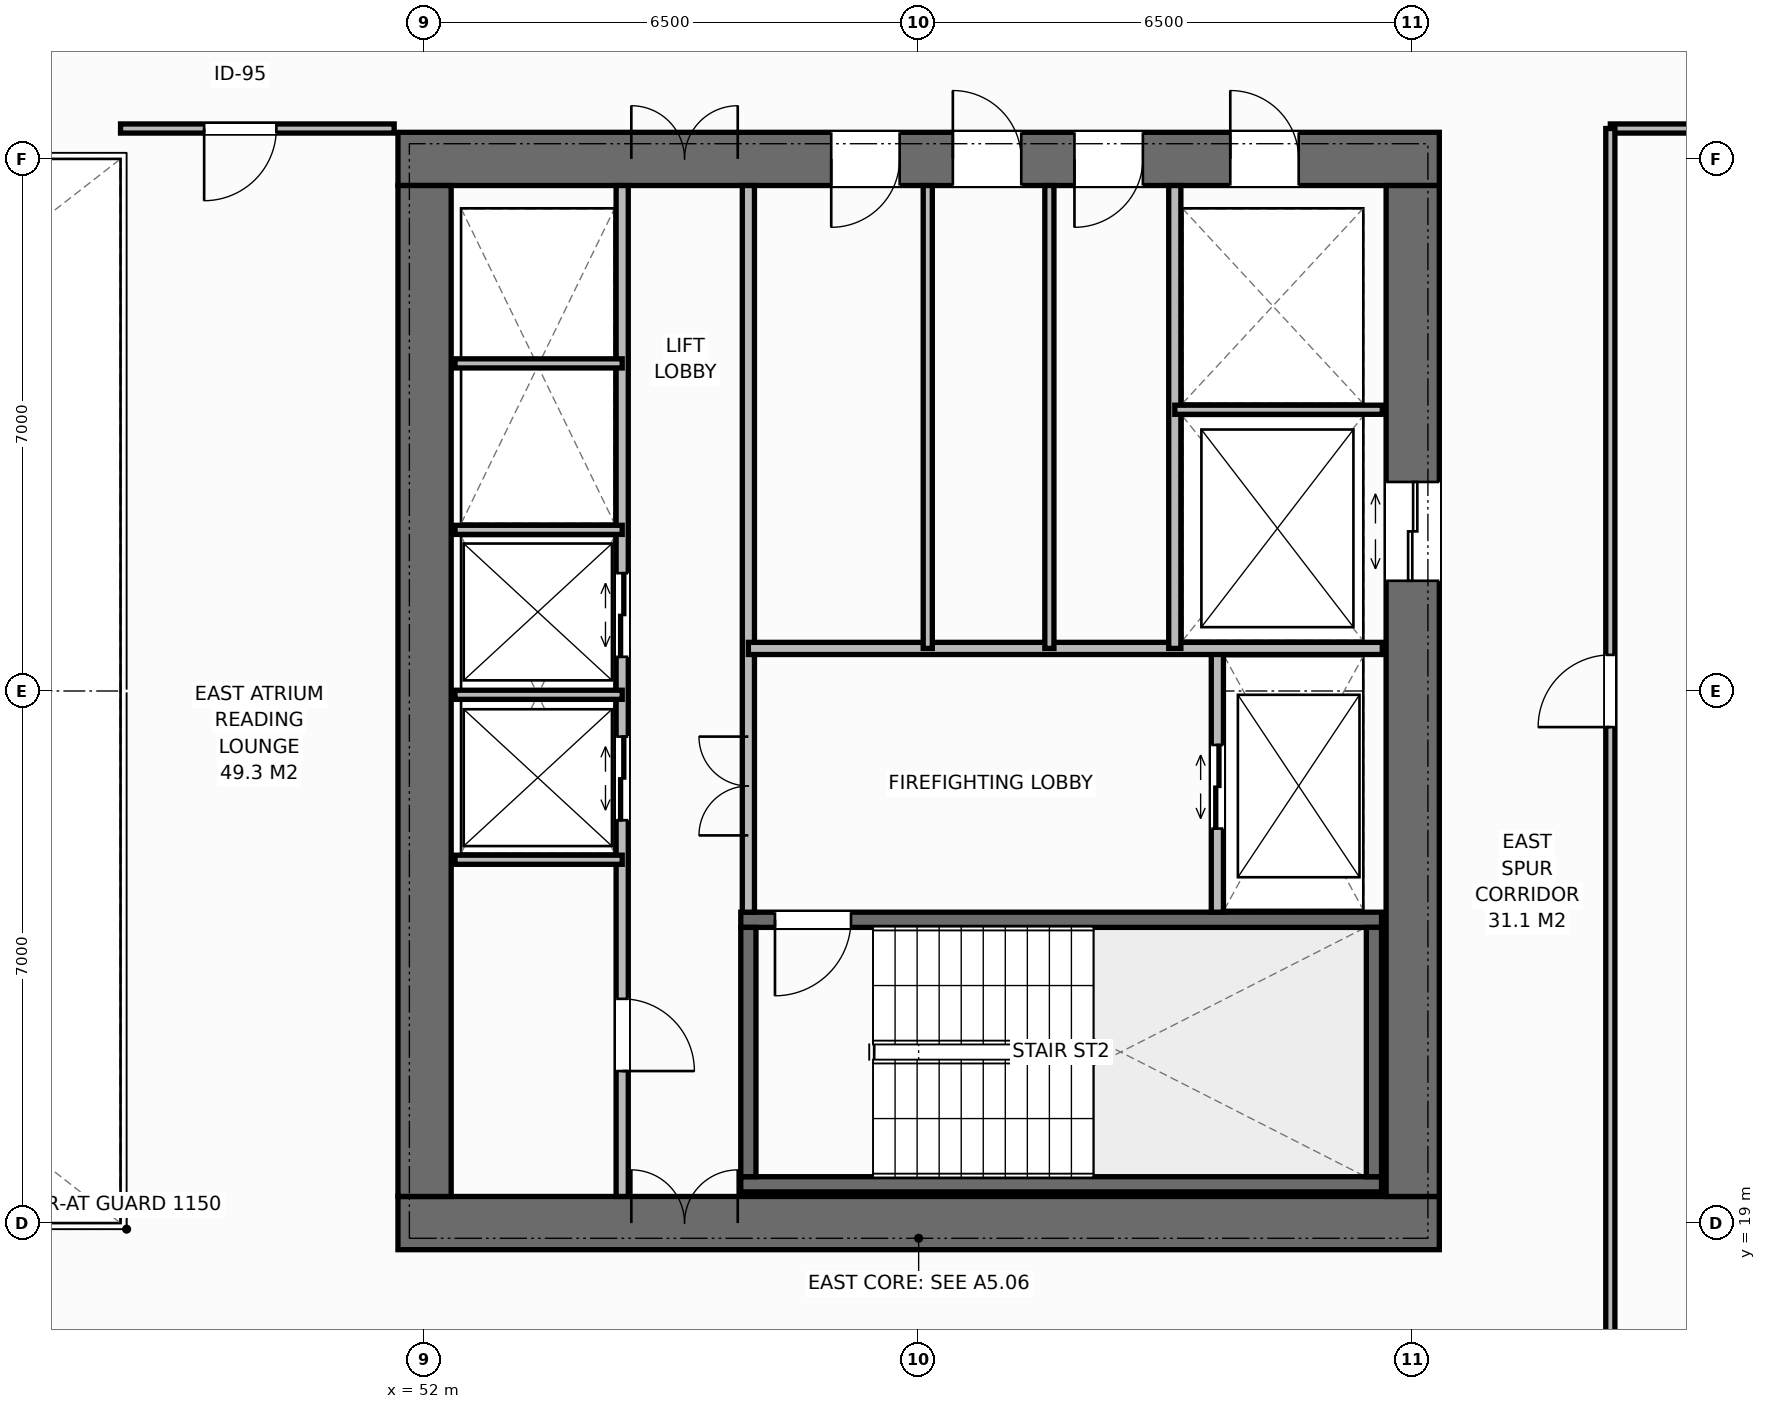
"""IFC4 building model, lengths in metres.
Left out: names, types, materials, properties, quantities, classifications, styles, units other than length and angle.
Written with IfcOpenShell. Run it as: python <this file> out.ifc"""

import sys

from ifc_helpers import new_model, si_unit, direction, frame, frame_2d, origin, place, context, subcontext, project, spatial, rectangle, extrude, element, fill, save


model = new_model("IFC4")
c1 = context("Model", 3, precision=1e-05, world=origin(), true_north=direction((0.0, 1.0)))
c2 = subcontext(c1, "Body", "Model", "MODEL_VIEW")
j1 = project(units=[si_unit("LENGTHUNIT", "METRE"), si_unit("PLANEANGLEUNIT", "RADIAN")], contexts=[c1])
p1 = place(None, origin())
s1 = spatial("IfcSite", under=j1, at=p1, CompositionType="ELEMENT")
p2 = place(p1, origin())
s2 = spatial("IfcBuilding", under=s1, at=p2, CompositionType="ELEMENT")
p3 = place(p2, frame((0.0, 0.0, 105.0)))
s3 = spatial("IfcBuildingStorey", under=s2, at=p3, CompositionType="ELEMENT", Elevation=105.0)
p4 = place(p3, frame((51.65, 19.0, 0.0), z_axis=(0.0, 0.0, 1.0), x_axis=(1.0, 0.0, 0.0)))
e1 = element("IfcWall", 1, at=p4, inside=s3, PredefinedType="SHEAR", context=c2, shape_type="SweptSolid", body=[
    extrude(rectangle(XDim=13.7, YDim=0.7, at=frame_2d((6.85, 0.0))), origin(), (0.0, 0.0, 1.0), 3.8),
])
p5 = place(p4, frame((3.07, 0.0, 0.0)))
e2 = element("IfcOpeningElement", 2, at=p5, cuts=e1, PredefinedType="OPENING", context=c2, shape_type="SweptSolid", body=[
    extrude(rectangle(XDim=1.4, YDim=2.2, at=frame_2d((0.7, 1.1))), frame((0.0, 0.36, 0.0), z_axis=(0.0, -1.0, 0.0), x_axis=(1.0, 0.0, 0.0)), (0.0, 0.0, 1.0), 0.72),
])
p6 = place(p3, frame((51.65, 33.0, 0.0), z_axis=(0.0, 0.0, 1.0), x_axis=(1.0, 0.0, 0.0)))
e3 = element("IfcWall", 3, at=p6, inside=s3, PredefinedType="SHEAR", context=c2, shape_type="SweptSolid", body=[
    extrude(rectangle(XDim=13.7, YDim=0.7, at=frame_2d((6.85, 0.0))), origin(), (0.0, 0.0, 1.0), 3.8),
])
p7 = place(p6, frame((3.07, 0.0, 0.0)))
e4 = element("IfcOpeningElement", 4, at=p7, cuts=e3, PredefinedType="OPENING", context=c2, shape_type="SweptSolid", body=[
    extrude(rectangle(XDim=1.4, YDim=2.2, at=frame_2d((0.7, 1.1))), frame((0.0, 0.36, 0.0), z_axis=(0.0, -1.0, 0.0), x_axis=(1.0, 0.0, 0.0)), (0.0, 0.0, 1.0), 0.72),
])
p8 = place(p6, frame((10.95, 0.0, 0.0)))
e5 = element("IfcOpeningElement", 5, at=p8, cuts=e3, PredefinedType="OPENING", context=c2, shape_type="SweptSolid", body=[
    extrude(rectangle(XDim=0.9, YDim=2.15, at=frame_2d((0.45, 1.075))), frame((0.0, 0.36, 0.0), z_axis=(0.0, -1.0, 0.0), x_axis=(1.0, 0.0, 0.0)), (0.0, 0.0, 1.0), 0.72),
])
p9 = place(p6, frame((5.7, 0.0, 0.0)))
e6 = element("IfcOpeningElement", 6, at=p9, cuts=e3, PredefinedType="OPENING", context=c2, shape_type="SweptSolid", body=[
    extrude(rectangle(XDim=0.9, YDim=2.15, at=frame_2d((0.45, 1.075))), frame((0.0, 0.36, 0.0), z_axis=(0.0, -1.0, 0.0), x_axis=(1.0, 0.0, 0.0)), (0.0, 0.0, 1.0), 0.72),
])
p10 = place(p6, frame((7.3, 0.0, 0.0)))
e7 = element("IfcOpeningElement", 7, at=p10, cuts=e3, PredefinedType="OPENING", context=c2, shape_type="SweptSolid", body=[
    extrude(rectangle(XDim=0.9, YDim=2.15, at=frame_2d((0.45, 1.075))), frame((0.0, 0.36, 0.0), z_axis=(0.0, -1.0, 0.0), x_axis=(1.0, 0.0, 0.0)), (0.0, 0.0, 1.0), 0.72),
])
p11 = place(p6, frame((8.9, 0.0, 0.0)))
e8 = element("IfcOpeningElement", 8, at=p11, cuts=e3, PredefinedType="OPENING", context=c2, shape_type="SweptSolid", body=[
    extrude(rectangle(XDim=0.9, YDim=2.15, at=frame_2d((0.45, 1.075))), frame((0.0, 0.36, 0.0), z_axis=(0.0, -1.0, 0.0), x_axis=(1.0, 0.0, 0.0)), (0.0, 0.0, 1.0), 0.72),
])
p12 = place(p3, frame((52.0, 19.35, 0.0), z_axis=(0.0, 0.0, 1.0), x_axis=(0.0, 1.0, 0.0)))
e9 = element("IfcWall", 9, at=p12, inside=s3, PredefinedType="SHEAR", context=c2, shape_type="SweptSolid", body=[
    extrude(rectangle(XDim=13.3, YDim=0.7, at=frame_2d((6.65, 0.0))), origin(), (0.0, 0.0, 1.0), 3.8),
])
p13 = place(p3, frame((65.0, 19.35, 0.0), z_axis=(0.0, 0.0, 1.0), x_axis=(0.0, 1.0, 0.0)))
e10 = element("IfcWall", 10, at=p13, inside=s3, PredefinedType="SHEAR", context=c2, shape_type="SweptSolid", body=[
    extrude(rectangle(XDim=13.3, YDim=0.7, at=frame_2d((6.65, 0.0))), origin(), (0.0, 0.0, 1.0), 3.8),
])
p14 = place(p13, frame((8.1, 0.0, 0.0)))
e11 = element("IfcOpeningElement", 11, at=p14, cuts=e10, PredefinedType="OPENING", context=c2, shape_type="SweptSolid", body=[
    extrude(rectangle(XDim=1.3, YDim=2.2, at=frame_2d((0.65, 1.1))), frame((0.0, 0.36, 0.0), z_axis=(0.0, -1.0, 0.0), x_axis=(1.0, 0.0, 0.0)), (0.0, 0.0, 1.0), 0.72),
])
p15 = place(p3, frame((56.16, 19.51, 0.0), z_axis=(0.0, 0.0, 1.0), x_axis=(1.0, 0.0, 0.0)))
e12 = element("IfcWall", 12, at=p15, inside=s3, PredefinedType="SHEAR", context=c2, shape_type="SweptSolid", body=[
    extrude(rectangle(XDim=8.43, YDim=0.2, at=frame_2d((4.215, 0.0))), origin(), (0.0, 0.0, 1.0), 3.8),
])
p16 = place(p3, frame((56.16, 22.99, 0.0), z_axis=(0.0, 0.0, 1.0), x_axis=(1.0, 0.0, 0.0)))
e13 = element("IfcWall", 13, at=p16, inside=s3, PredefinedType="SHEAR", context=c2, shape_type="SweptSolid", body=[
    extrude(rectangle(XDim=8.43, YDim=0.2, at=frame_2d((4.215, 0.0))), origin(), (0.0, 0.0, 1.0), 3.8),
])
p17 = place(p16, frame((0.45, 0.0, 0.0)))
e14 = element("IfcOpeningElement", 14, at=p17, cuts=e13, PredefinedType="OPENING", context=c2, shape_type="SweptSolid", body=[
    extrude(rectangle(XDim=1.0, YDim=2.15, at=frame_2d((0.5, 1.075))), frame((0.0, 0.11, 0.0), z_axis=(0.0, -1.0, 0.0), x_axis=(1.0, 0.0, 0.0)), (0.0, 0.0, 1.0), 0.22),
])
for number, where, z_axis, x_axis in (
    (15, (56.26, 19.61, 0.0), (0.0, 0.0, 1.0), (0.0, 1.0, 0.0)),
    (16, (64.49, 19.61, 0.0), (0.0, 0.0, 1.0), (0.0, 1.0, 0.0)),
):
    element("IfcWall", number, at=place(p3, frame(where, z_axis=z_axis, x_axis=x_axis)), inside=s3, PredefinedType="SHEAR", context=c2, shape_type="SweptSolid", body=[
        extrude(rectangle(XDim=3.28, YDim=0.2, at=frame_2d((1.64, 0.0))), origin(), (0.0, 0.0, 1.0), 3.8),
    ])
p18 = place(p3, frame((54.6, 19.35, 0.0), z_axis=(0.0, 0.0, 1.0), x_axis=(0.0, 1.0, 0.0)))
e17 = element("IfcWall", 17, at=p18, inside=s3, PredefinedType="STANDARD", context=c2, shape_type="SweptSolid", body=[
    extrude(rectangle(XDim=13.3, YDim=0.16, at=frame_2d((6.65, 0.0))), origin(), (0.0, 0.0, 1.0), 3.565),
])
p19 = place(p18, frame((1.65, 0.0, 0.0)))
e18 = element("IfcOpeningElement", 18, at=p19, cuts=e17, PredefinedType="OPENING", context=c2, shape_type="SweptSolid", body=[
    extrude(rectangle(XDim=0.95, YDim=2.15, at=frame_2d((0.475, 1.075))), frame((0.0, 0.09, 0.0), z_axis=(0.0, -1.0, 0.0), x_axis=(1.0, 0.0, 0.0)), (0.0, 0.0, 1.0), 0.18),
])
p20 = place(p18, frame((4.95, 0.0, 0.0)))
e19 = element("IfcOpeningElement", 19, at=p20, cuts=e17, PredefinedType="OPENING", context=c2, shape_type="SweptSolid", body=[
    extrude(rectangle(XDim=1.1, YDim=2.2, at=frame_2d((0.55, 1.1))), frame((0.0, 0.09, 0.0), z_axis=(0.0, -1.0, 0.0), x_axis=(1.0, 0.0, 0.0)), (0.0, 0.0, 1.0), 0.18),
])
p21 = place(p18, frame((7.1, 0.0, 0.0)))
e20 = element("IfcOpeningElement", 20, at=p21, cuts=e17, PredefinedType="OPENING", context=c2, shape_type="SweptSolid", body=[
    extrude(rectangle(XDim=1.1, YDim=2.2, at=frame_2d((0.55, 1.1))), frame((0.0, 0.09, 0.0), z_axis=(0.0, -1.0, 0.0), x_axis=(1.0, 0.0, 0.0)), (0.0, 0.0, 1.0), 0.18),
])
p22 = place(p3, frame((56.26, 23.09, 0.0), z_axis=(0.0, 0.0, 1.0), x_axis=(0.0, 1.0, 0.0)))
e21 = element("IfcWall", 21, at=p22, inside=s3, PredefinedType="STANDARD", context=c2, shape_type="SweptSolid", body=[
    extrude(rectangle(XDim=9.56, YDim=0.16, at=frame_2d((4.78, 0.0))), origin(), (0.0, 0.0, 1.0), 3.565),
])
p23 = place(p22, frame((1.01, 0.0, 0.0)))
e22 = element("IfcOpeningElement", 22, at=p23, cuts=e21, PredefinedType="OPENING", context=c2, shape_type="SweptSolid", body=[
    extrude(rectangle(XDim=1.3, YDim=2.2, at=frame_2d((0.65, 1.1))), frame((0.0, 0.09, 0.0), z_axis=(0.0, -1.0, 0.0), x_axis=(1.0, 0.0, 0.0)), (0.0, 0.0, 1.0), 0.18),
])
for number, where, z_axis, x_axis in (
    (23, (52.4, 23.78, 0.0), (0.0, 0.0, 1.0), (1.0, 0.0, 0.0)),
    (24, (52.4, 25.95, 0.0), (0.0, 0.0, 1.0), (1.0, 0.0, 0.0)),
    (25, (52.4, 28.12, 0.0), (0.0, 0.0, 1.0), (1.0, 0.0, 0.0)),
    (26, (52.4, 30.31, 0.0), (0.0, 0.0, 1.0), (1.0, 0.0, 0.0)),
):
    element("IfcWall", number, at=place(p3, frame(where, z_axis=z_axis, x_axis=x_axis)), inside=s3, PredefinedType="PARTITIONING", context=c2, shape_type="SweptSolid", body=[
        extrude(rectangle(XDim=2.2, YDim=0.12, at=frame_2d((1.1, 0.0))), origin(), (0.0, 0.0, 1.0), 3.565),
    ])
p24 = place(p3, frame((62.43, 23.09, 0.0), z_axis=(0.0, 0.0, 1.0), x_axis=(0.0, 1.0, 0.0)))
e27 = element("IfcWall", 27, at=p24, inside=s3, PredefinedType="STANDARD", context=c2, shape_type="SweptSolid", body=[
    extrude(rectangle(XDim=3.47, YDim=0.16, at=frame_2d((1.735, 0.0))), origin(), (0.0, 0.0, 1.0), 3.565),
])
p25 = place(p24, frame((1.1, 0.0, 0.0)))
e28 = element("IfcOpeningElement", 28, at=p25, cuts=e27, PredefinedType="OPENING", context=c2, shape_type="SweptSolid", body=[
    extrude(rectangle(XDim=1.1, YDim=2.2, at=frame_2d((0.55, 1.1))), frame((0.0, 0.09, 0.0), z_axis=(0.0, -1.0, 0.0), x_axis=(1.0, 0.0, 0.0)), (0.0, 0.0, 1.0), 0.18),
])
p26 = place(p3, frame((56.26, 26.56, 0.0), z_axis=(0.0, 0.0, 1.0), x_axis=(1.0, 0.0, 0.0)))
e29 = element("IfcWall", 29, at=p26, inside=s3, PredefinedType="STANDARD", context=c2, shape_type="SweptSolid", body=[
    extrude(rectangle(XDim=8.34, YDim=0.16, at=frame_2d((4.17, 0.0))), origin(), (0.0, 0.0, 1.0), 3.565),
])
p27 = place(p3, frame((61.87, 26.56, 0.0), z_axis=(0.0, 0.0, 1.0), x_axis=(0.0, 1.0, 0.0)))
e30 = element("IfcWall", 30, at=p27, inside=s3, PredefinedType="STANDARD", context=c2, shape_type="SweptSolid", body=[
    extrude(rectangle(XDim=6.09, YDim=0.16, at=frame_2d((3.045, 0.0))), origin(), (0.0, 0.0, 1.0), 3.565),
])
p28 = place(p3, frame((61.87, 29.7, 0.0), z_axis=(0.0, 0.0, 1.0), x_axis=(1.0, 0.0, 0.0)))
e31 = element("IfcWall", 31, at=p28, inside=s3, PredefinedType="PARTITIONING", context=c2, shape_type="SweptSolid", body=[
    extrude(rectangle(XDim=2.73, YDim=0.12, at=frame_2d((1.365, 0.0))), origin(), (0.0, 0.0, 1.0), 3.565),
])
for number, where, z_axis, x_axis in (
    (32, (58.62, 26.56, 0.0), (0.0, 0.0, 1.0), (0.0, 1.0, 0.0)),
    (33, (60.22, 26.56, 0.0), (0.0, 0.0, 1.0), (0.0, 1.0, 0.0)),
):
    element("IfcWall", number, at=place(p3, frame(where, z_axis=z_axis, x_axis=x_axis)), inside=s3, PredefinedType="PARTITIONING", context=c2, shape_type="SweptSolid", body=[
        extrude(rectangle(XDim=6.09, YDim=0.12, at=frame_2d((3.045, 0.0))), origin(), (0.0, 0.0, 1.0), 3.565),
    ])
p29 = place(p3, frame((48.0, 33.4, 0.0), z_axis=(0.0, 0.0, 1.0), x_axis=(1.0, 0.0, 0.0)))
e34 = element("IfcWall", 34, at=p29, inside=s3, PredefinedType="PARTITIONING", context=c2, shape_type="SweptSolid", body=[
    extrude(rectangle(XDim=3.6, YDim=0.12, at=frame_2d((1.8, 0.0))), origin(), (0.0, 0.0, 1.0), 3.565),
])
p30 = place(p29, frame((1.1, 0.0, 0.0)))
e35 = element("IfcOpeningElement", 35, at=p30, cuts=e34, PredefinedType="OPENING", context=c2, shape_type="SweptSolid", body=[
    extrude(rectangle(XDim=0.95, YDim=2.15, at=frame_2d((0.475, 1.075))), frame((0.0, 0.07, 0.0), z_axis=(0.0, -1.0, 0.0), x_axis=(1.0, 0.0, 0.0)), (0.0, 0.0, 1.0), 0.14),
])
p31 = place(p3, frame((67.6, 33.4, 0.0), z_axis=(0.0, 0.0, 1.0), x_axis=(1.0, 0.0, 0.0)))
e36 = element("IfcWall", 36, at=p31, inside=s3, PredefinedType="PARTITIONING", context=c2, shape_type="SweptSolid", body=[
    extrude(rectangle(XDim=8.58, YDim=0.12, at=frame_2d((4.29, 0.0))), origin(), (0.0, 0.0, 1.0), 3.565),
])
p32 = place(p3, frame((67.6, 16.5, 0.0), z_axis=(0.0, 0.0, 1.0), x_axis=(0.0, 1.0, 0.0)))
e37 = element("IfcWall", 37, at=p32, inside=s3, PredefinedType="PARTITIONING", context=c2, shape_type="SweptSolid", body=[
    extrude(rectangle(XDim=16.9, YDim=0.12, at=frame_2d((8.45, 0.0))), origin(), (0.0, 0.0, 1.0), 3.565),
])
p33 = place(p32, frame((9.025, 0.0, 0.0)))
e38 = element("IfcOpeningElement", 38, at=p33, cuts=e37, PredefinedType="OPENING", context=c2, shape_type="SweptSolid", body=[
    extrude(rectangle(XDim=0.95, YDim=2.15, at=frame_2d((0.475, 1.075))), frame((0.0, 0.07, 0.0), z_axis=(0.0, -1.0, 0.0), x_axis=(1.0, 0.0, 0.0)), (0.0, 0.0, 1.0), 0.14),
])
p34 = place(p5, origin())
e39 = element("IfcDoor", 39, at=p34, inside=s3, OperationType="DOUBLE_DOOR_SINGLE_SWING", PredefinedType="DOOR", context=c2, shape_type="SweptSolid", body=[
    extrude(rectangle(XDim=1.4, YDim=2.2, at=frame_2d((0.7, 1.1))), frame((0.0, 0.125, 0.0), z_axis=(0.0, -1.0, 0.0), x_axis=(1.0, 0.0, 0.0)), (0.0, 0.0, 1.0), 0.05),
])
fill(e2, e39)
p35 = place(p7, origin())
e40 = element("IfcDoor", 40, at=p35, inside=s3, OperationType="DOUBLE_DOOR_SINGLE_SWING", PredefinedType="DOOR", context=c2, shape_type="SweptSolid", body=[
    extrude(rectangle(XDim=1.4, YDim=2.2, at=frame_2d((0.7, 1.1))), frame((0.0, -0.075, 0.0), z_axis=(0.0, -1.0, 0.0), x_axis=(1.0, 0.0, 0.0)), (0.0, 0.0, 1.0), 0.05),
])
fill(e4, e40)
p36 = place(p19, origin())
e41 = element("IfcDoor", 41, at=p36, inside=s3, OperationType="SINGLE_SWING_RIGHT", PredefinedType="DOOR", context=c2, shape_type="SweptSolid", body=[
    extrude(rectangle(XDim=0.95, YDim=2.15, at=frame_2d((0.475, 1.075))), frame((0.0, 0.025, 0.0), z_axis=(0.0, -1.0, 0.0), x_axis=(1.0, 0.0, 0.0)), (0.0, 0.0, 1.0), 0.05),
])
fill(e18, e41)
p37 = place(p20, origin())
e42 = element("IfcDoor", 42, at=p37, inside=s3, OperationType="DOUBLE_DOOR_SLIDING", PredefinedType="DOOR", context=c2, shape_type="SweptSolid", body=[
    extrude(rectangle(XDim=1.1, YDim=2.2, at=frame_2d((0.55, 1.1))), frame((0.0, 0.025, 0.0), z_axis=(0.0, -1.0, 0.0), x_axis=(1.0, 0.0, 0.0)), (0.0, 0.0, 1.0), 0.05),
])
fill(e19, e42)
p38 = place(p21, origin())
e43 = element("IfcDoor", 43, at=p38, inside=s3, OperationType="DOUBLE_DOOR_SLIDING", PredefinedType="DOOR", context=c2, shape_type="SweptSolid", body=[
    extrude(rectangle(XDim=1.1, YDim=2.2, at=frame_2d((0.55, 1.1))), frame((0.0, 0.025, 0.0), z_axis=(0.0, -1.0, 0.0), x_axis=(1.0, 0.0, 0.0)), (0.0, 0.0, 1.0), 0.05),
])
fill(e20, e43)
p39 = place(p17, origin())
e44 = element("IfcDoor", 44, at=p39, inside=s3, OperationType="SINGLE_SWING_RIGHT", PredefinedType="DOOR", context=c2, shape_type="SweptSolid", body=[
    extrude(rectangle(XDim=1.0, YDim=2.15, at=frame_2d((0.5, 1.075))), frame((0.0, 0.025, 0.0), z_axis=(0.0, -1.0, 0.0), x_axis=(1.0, 0.0, 0.0)), (0.0, 0.0, 1.0), 0.05),
])
fill(e14, e44)
p40 = place(p25, origin())
e45 = element("IfcDoor", 45, at=p40, inside=s3, OperationType="DOUBLE_DOOR_SLIDING", PredefinedType="DOOR", context=c2, shape_type="SweptSolid", body=[
    extrude(rectangle(XDim=1.1, YDim=2.2, at=frame_2d((0.55, 1.1))), frame((0.0, 0.025, 0.0), z_axis=(0.0, -1.0, 0.0), x_axis=(1.0, 0.0, 0.0)), (0.0, 0.0, 1.0), 0.05),
])
fill(e28, e45)
p41 = place(p23, origin())
e46 = element("IfcDoor", 46, at=p41, inside=s3, OperationType="DOUBLE_DOOR_SINGLE_SWING", PredefinedType="DOOR", context=c2, shape_type="SweptSolid", body=[
    extrude(rectangle(XDim=1.3, YDim=2.2, at=frame_2d((0.65, 1.1))), frame((0.0, 0.025, 0.0), z_axis=(0.0, -1.0, 0.0), x_axis=(1.0, 0.0, 0.0)), (0.0, 0.0, 1.0), 0.05),
])
fill(e22, e46)
p42 = place(p14, origin())
e47 = element("IfcDoor", 47, at=p42, inside=s3, OperationType="DOUBLE_DOOR_SLIDING", PredefinedType="DOOR", context=c2, shape_type="SweptSolid", body=[
    extrude(rectangle(XDim=1.3, YDim=2.2, at=frame_2d((0.65, 1.1))), frame((0.0, 0.025, 0.0), z_axis=(0.0, -1.0, 0.0), x_axis=(1.0, 0.0, 0.0)), (0.0, 0.0, 1.0), 0.05),
])
fill(e11, e47)
p43 = place(p8, origin())
e48 = element("IfcDoor", 48, at=p43, inside=s3, OperationType="SINGLE_SWING_LEFT", PredefinedType="DOOR", context=c2, shape_type="SweptSolid", body=[
    extrude(rectangle(XDim=0.9, YDim=2.15, at=frame_2d((0.45, 1.075))), frame((0.0, -0.075, 0.0), z_axis=(0.0, -1.0, 0.0), x_axis=(1.0, 0.0, 0.0)), (0.0, 0.0, 1.0), 0.05),
])
fill(e5, e48)
p44 = place(p9, origin())
e49 = element("IfcDoor", 49, at=p44, inside=s3, OperationType="SINGLE_SWING_RIGHT", PredefinedType="DOOR", context=c2, shape_type="SweptSolid", body=[
    extrude(rectangle(XDim=0.9, YDim=2.15, at=frame_2d((0.45, 1.075))), frame((0.0, -0.075, 0.0), z_axis=(0.0, -1.0, 0.0), x_axis=(1.0, 0.0, 0.0)), (0.0, 0.0, 1.0), 0.05),
])
fill(e6, e49)
p45 = place(p10, origin())
e50 = element("IfcDoor", 50, at=p45, inside=s3, OperationType="SINGLE_SWING_LEFT", PredefinedType="DOOR", context=c2, shape_type="SweptSolid", body=[
    extrude(rectangle(XDim=0.9, YDim=2.15, at=frame_2d((0.45, 1.075))), frame((0.0, -0.075, 0.0), z_axis=(0.0, -1.0, 0.0), x_axis=(1.0, 0.0, 0.0)), (0.0, 0.0, 1.0), 0.05),
])
fill(e7, e50)
p46 = place(p11, origin())
e51 = element("IfcDoor", 51, at=p46, inside=s3, OperationType="SINGLE_SWING_RIGHT", PredefinedType="DOOR", context=c2, shape_type="SweptSolid", body=[
    extrude(rectangle(XDim=0.9, YDim=2.15, at=frame_2d((0.45, 1.075))), frame((0.0, -0.075, 0.0), z_axis=(0.0, -1.0, 0.0), x_axis=(1.0, 0.0, 0.0)), (0.0, 0.0, 1.0), 0.05),
])
fill(e8, e51)
p47 = place(p30, origin())
e52 = element("IfcDoor", 52, at=p47, inside=s3, OperationType="SINGLE_SWING_RIGHT", PredefinedType="DOOR", context=c2, shape_type="SweptSolid", body=[
    extrude(rectangle(XDim=0.95, YDim=2.15, at=frame_2d((0.475, 1.075))), frame((0.0, 0.025, 0.0), z_axis=(0.0, -1.0, 0.0), x_axis=(1.0, 0.0, 0.0)), (0.0, 0.0, 1.0), 0.05),
])
fill(e35, e52)
p48 = place(p33, origin())
e53 = element("IfcDoor", 53, at=p48, inside=s3, OperationType="SINGLE_SWING_LEFT", PredefinedType="DOOR", context=c2, shape_type="SweptSolid", body=[
    extrude(rectangle(XDim=0.95, YDim=2.15, at=frame_2d((0.475, 1.075))), frame((0.0, 0.025, 0.0), z_axis=(0.0, -1.0, 0.0), x_axis=(1.0, 0.0, 0.0)), (0.0, 0.0, 1.0), 0.05),
])
fill(e38, e53)
save(model, sys.argv[1])
